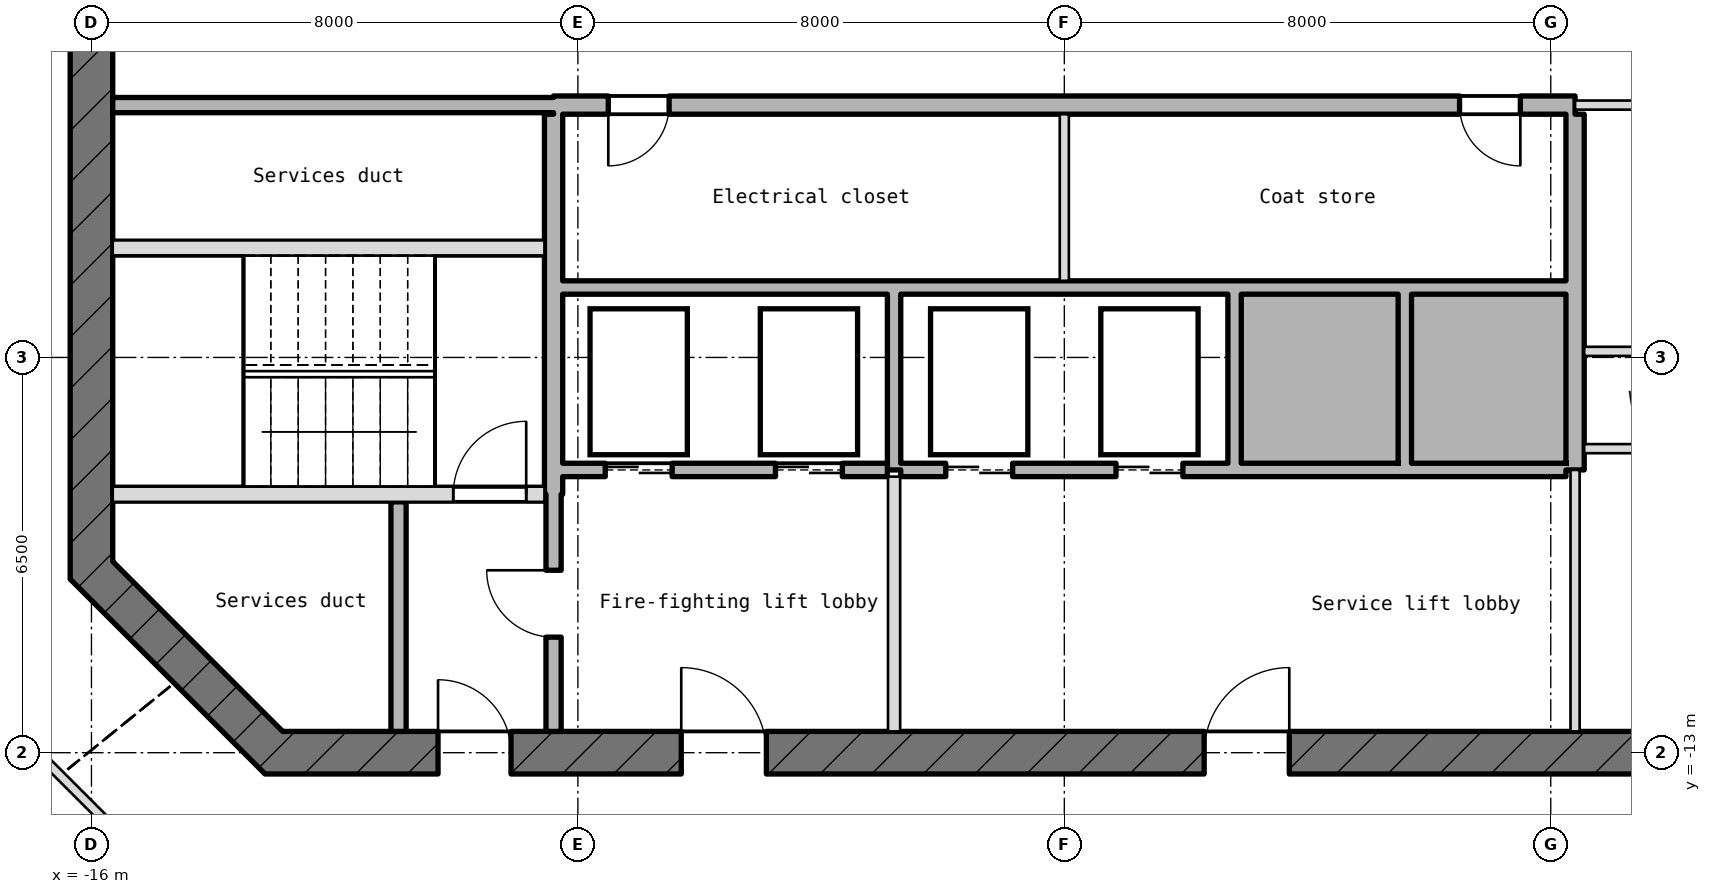
"""IFC4 building model, lengths in metres.
Left out: names, types, materials, properties, quantities, classifications, styles, units other than length and angle.
Written with IfcOpenShell. Run it as: python <this file> out.ifc"""

import sys

from ifc_helpers import new_model, si_unit, direction, frame, frame_2d, origin, place, context, subcontext, project, spatial, rectangle, extrude, element, fill, save


model = new_model("IFC4")
c1 = context("Model", 3, precision=1e-05, world=origin(), true_north=direction((0.0, 1.0)))
c2 = subcontext(c1, "Body", "Model", "MODEL_VIEW")
j1 = project(units=[si_unit("LENGTHUNIT", "METRE"), si_unit("PLANEANGLEUNIT", "RADIAN")], contexts=[c1])
p1 = place(None, origin())
s1 = spatial("IfcSite", under=j1, at=p1, CompositionType="ELEMENT")
p2 = place(p1, origin())
s2 = spatial("IfcBuilding", under=s1, at=p2, CompositionType="ELEMENT")
p3 = place(p2, frame((0.0, 0.0, 401.95)))
s3 = spatial("IfcBuildingStorey", under=s2, at=p3, CompositionType="ELEMENT", Elevation=401.95)
p4 = place(p3, frame((-16.0, 10.145, -0.25), z_axis=(0.0, 0.0, 1.0), x_axis=(0.0, -1.0, 0.0)))
e1 = element("IfcWall", 1, at=p4, inside=s3, PredefinedType="SHEAR", context=c2, shape_type="SweptSolid", body=[
    extrude(rectangle(XDim=20.29, YDim=0.7, at=frame_2d((10.145, 0.0))), origin(), (0.0, 0.0, 1.0), 5.55),
])
p5 = place(p4, frame((8.945, 0.0, 0.25)))
e2 = element("IfcOpeningElement", 2, at=p5, cuts=e1, PredefinedType="OPENING", context=c2, shape_type="SweptSolid", body=[
    extrude(rectangle(XDim=2.4, YDim=2.1, at=frame_2d((1.2, 1.05))), frame((0.0, 0.36, 0.0), z_axis=(0.0, -1.0, 0.0), x_axis=(1.0, 0.0, 0.0)), (0.0, 0.0, 1.0), 0.72),
])
p6 = place(p4, frame((5.545, 0.0, 0.25)))
e3 = element("IfcOpeningElement", 3, at=p6, cuts=e1, PredefinedType="OPENING", context=c2, shape_type="SweptSolid", body=[
    extrude(rectangle(XDim=1.2, YDim=2.1, at=frame_2d((0.6, 1.05))), frame((0.0, 0.36, 0.0), z_axis=(0.0, -1.0, 0.0), x_axis=(1.0, 0.0, 0.0)), (0.0, 0.0, 1.0), 0.72),
])
p7 = place(p3, frame((-16.103, -9.897, -0.25), z_axis=(0.0, 0.0, 1.0), x_axis=(0.707106781187, -0.707106781187, 0.0)))
e4 = element("IfcWall", 4, at=p7, inside=s3, PredefinedType="SHEAR", context=c2, shape_type="SweptSolid", body=[
    extrude(rectangle(XDim=4.533, YDim=0.7, at=frame_2d((2.266, 0.0))), origin(), (0.0, 0.0, 1.0), 5.55),
])
p8 = place(p3, frame((-13.145, -13.0, -0.25), z_axis=(0.0, 0.0, 1.0), x_axis=(1.0, 0.0, 0.0)))
e5 = element("IfcWall", 5, at=p8, inside=s3, PredefinedType="SHEAR", context=c2, shape_type="SweptSolid", body=[
    extrude(rectangle(XDim=26.29, YDim=0.7, at=frame_2d((13.145, 0.0))), origin(), (0.0, 0.0, 1.0), 5.55),
])
p9 = place(p8, frame((2.845, 0.0, 0.25)))
e6 = element("IfcOpeningElement", 6, at=p9, cuts=e5, PredefinedType="OPENING", context=c2, shape_type="SweptSolid", body=[
    extrude(rectangle(XDim=1.2, YDim=2.1, at=frame_2d((0.6, 1.05))), frame((0.0, 0.36, 0.0), z_axis=(0.0, -1.0, 0.0), x_axis=(1.0, 0.0, 0.0)), (0.0, 0.0, 1.0), 0.72),
])
p10 = place(p8, frame((6.845, 0.0, 0.25)))
e7 = element("IfcOpeningElement", 7, at=p10, cuts=e5, PredefinedType="OPENING", context=c2, shape_type="SweptSolid", body=[
    extrude(rectangle(XDim=1.4, YDim=2.1, at=frame_2d((0.7, 1.05))), frame((0.0, 0.36, 0.0), z_axis=(0.0, -1.0, 0.0), x_axis=(1.0, 0.0, 0.0)), (0.0, 0.0, 1.0), 0.72),
])
p11 = place(p8, frame((15.445, 0.0, 0.25)))
e8 = element("IfcOpeningElement", 8, at=p11, cuts=e5, PredefinedType="OPENING", context=c2, shape_type="SweptSolid", body=[
    extrude(rectangle(XDim=1.4, YDim=2.1, at=frame_2d((0.7, 1.05))), frame((0.0, 0.36, 0.0), z_axis=(0.0, -1.0, 0.0), x_axis=(1.0, 0.0, 0.0)), (0.0, 0.0, 1.0), 0.72),
])
p12 = place(p3, frame((-15.65, -8.75, -0.25), z_axis=(0.0, 0.0, 1.0), x_axis=(1.0, 0.0, 0.0)))
e9 = element("IfcWall", 9, at=p12, inside=s3, PredefinedType="SHEAR", context=c2, shape_type="SweptSolid", body=[
    extrude(rectangle(XDim=7.1, YDim=0.25, at=frame_2d((3.55, 0.0))), origin(), (0.0, 0.0, 1.0), 5.55),
])
p13 = place(p12, frame((5.6, 0.0, 0.25)))
e10 = element("IfcOpeningElement", 10, at=p13, cuts=e9, PredefinedType="OPENING", context=c2, shape_type="SweptSolid", body=[
    extrude(rectangle(XDim=1.2, YDim=2.1, at=frame_2d((0.6, 1.05))), frame((0.0, 0.135, 0.0), z_axis=(0.0, -1.0, 0.0), x_axis=(1.0, 0.0, 0.0)), (0.0, 0.0, 1.0), 0.27),
])
p14 = place(p3, frame((-8.25, -8.35, 0.0), z_axis=(0.0, 0.0, 1.0), x_axis=(1.0, 0.0, 0.0)))
e11 = element("IfcWall", 11, at=p14, inside=s3, PredefinedType="STANDARD", context=c2, shape_type="SweptSolid", body=[
    extrude(rectangle(XDim=5.34, YDim=0.22, at=frame_2d((2.67, 0.0))), origin(), (0.0, 0.0, 1.0), 5.3),
])
p15 = place(p14, frame((0.7, 0.0, 0.0)))
e12 = element("IfcOpeningElement", 12, at=p15, cuts=e11, PredefinedType="OPENING", context=c2, shape_type="SweptSolid", body=[
    extrude(rectangle(XDim=1.1, YDim=2.1, at=frame_2d((0.55, 1.05))), frame((0.0, 0.12, 0.0), z_axis=(0.0, -1.0, 0.0), x_axis=(1.0, 0.0, 0.0)), (0.0, 0.0, 1.0), 0.24),
])
p16 = place(p14, frame((3.5, 0.0, 0.0)))
e13 = element("IfcOpeningElement", 13, at=p16, cuts=e11, PredefinedType="OPENING", context=c2, shape_type="SweptSolid", body=[
    extrude(rectangle(XDim=1.1, YDim=2.1, at=frame_2d((0.55, 1.05))), frame((0.0, 0.12, 0.0), z_axis=(0.0, -1.0, 0.0), x_axis=(1.0, 0.0, 0.0)), (0.0, 0.0, 1.0), 0.24),
])
p17 = place(p3, frame((-2.69, -8.35, 0.0), z_axis=(0.0, 0.0, 1.0), x_axis=(1.0, 0.0, 0.0)))
e14 = element("IfcWall", 14, at=p17, inside=s3, PredefinedType="STANDARD", context=c2, shape_type="SweptSolid", body=[
    extrude(rectangle(XDim=10.94, YDim=0.22, at=frame_2d((5.47, 0.0))), origin(), (0.0, 0.0, 1.0), 5.3),
])
p18 = place(p17, frame((0.74, 0.0, 0.0)))
e15 = element("IfcOpeningElement", 15, at=p18, cuts=e14, PredefinedType="OPENING", context=c2, shape_type="SweptSolid", body=[
    extrude(rectangle(XDim=1.1, YDim=2.1, at=frame_2d((0.55, 1.05))), frame((0.0, 0.12, 0.0), z_axis=(0.0, -1.0, 0.0), x_axis=(1.0, 0.0, 0.0)), (0.0, 0.0, 1.0), 0.24),
])
p19 = place(p17, frame((3.54, 0.0, 0.0)))
e16 = element("IfcOpeningElement", 16, at=p19, cuts=e14, PredefinedType="OPENING", context=c2, shape_type="SweptSolid", body=[
    extrude(rectangle(XDim=1.1, YDim=2.1, at=frame_2d((0.55, 1.05))), frame((0.0, 0.12, 0.0), z_axis=(0.0, -1.0, 0.0), x_axis=(1.0, 0.0, 0.0)), (0.0, 0.0, 1.0), 0.24),
])
p20 = place(p3, frame((8.55, -8.0, 0.0), z_axis=(0.0, 0.0, 1.0), x_axis=(1.0, 0.0, 0.0)))
e17 = element("IfcWall", 17, at=p20, inside=s3, PredefinedType="PARTITIONING", context=c2, shape_type="SweptSolid", body=[
    extrude(rectangle(XDim=7.1, YDim=0.15, at=frame_2d((3.55, 0.0))), origin(), (0.0, 0.0, 1.0), 5.3),
])
p21 = place(p20, frame((2.975, 0.0, 0.0)))
e18 = element("IfcOpeningElement", 18, at=p21, cuts=e17, PredefinedType="OPENING", context=c2, shape_type="SweptSolid", body=[
    extrude(rectangle(XDim=1.0, YDim=2.1, at=frame_2d((0.5, 1.05))), frame((0.0, 0.085, 0.0), z_axis=(0.0, -1.0, 0.0), x_axis=(1.0, 0.0, 0.0)), (0.0, 0.0, 1.0), 0.17),
])
p22 = place(p3, frame((8.55, -6.4, 0.0), z_axis=(0.0, 0.0, 1.0), x_axis=(1.0, 0.0, 0.0)))
e19 = element("IfcWall", 19, at=p22, inside=s3, PredefinedType="PARTITIONING", context=c2, shape_type="SweptSolid", body=[
    extrude(rectangle(XDim=7.1, YDim=0.15, at=frame_2d((3.55, 0.0))), origin(), (0.0, 0.0, 1.0), 5.3),
])
p23 = place(p22, frame((2.975, 0.0, 0.0)))
e20 = element("IfcOpeningElement", 20, at=p23, cuts=e19, PredefinedType="OPENING", context=c2, shape_type="SweptSolid", body=[
    extrude(rectangle(XDim=1.0, YDim=2.1, at=frame_2d((0.5, 1.05))), frame((0.0, 0.085, 0.0), z_axis=(0.0, -1.0, 0.0), x_axis=(1.0, 0.0, 0.0)), (0.0, 0.0, 1.0), 0.17),
])
p24 = place(p3, frame((-8.25, -5.35, 0.0), z_axis=(0.0, 0.0, 1.0), x_axis=(1.0, 0.0, 0.0)))
e21 = element("IfcWall", 21, at=p24, inside=s3, PredefinedType="STANDARD", context=c2, shape_type="SweptSolid", body=[
    extrude(rectangle(XDim=16.5, YDim=0.22, at=frame_2d((8.25, 0.0))), origin(), (0.0, 0.0, 1.0), 5.3),
])
p25 = place(p3, frame((-15.65, -4.7, -0.25), z_axis=(0.0, 0.0, 1.0), x_axis=(1.0, 0.0, 0.0)))
e22 = element("IfcWall", 22, at=p25, inside=s3, PredefinedType="SHEAR", context=c2, shape_type="SweptSolid", body=[
    extrude(rectangle(XDim=7.1, YDim=0.25, at=frame_2d((3.55, 0.0))), origin(), (0.0, 0.0, 1.0), 5.55),
])
p26 = place(p3, frame((-15.65, -2.35, 0.0), z_axis=(0.0, 0.0, 1.0), x_axis=(1.0, 0.0, 0.0)))
e23 = element("IfcWall", 23, at=p26, inside=s3, PredefinedType="STANDARD", context=c2, shape_type="SweptSolid", body=[
    extrude(rectangle(XDim=7.25, YDim=0.25, at=frame_2d((3.625, 0.0))), origin(), (0.0, 0.0, 1.0), 5.3),
])
p27 = place(p3, frame((-8.4, -2.35, -0.25), z_axis=(0.0, 0.0, 1.0), x_axis=(1.0, 0.0, 0.0)))
e24 = element("IfcWall", 24, at=p27, inside=s3, PredefinedType="SHEAR", context=c2, shape_type="SweptSolid", body=[
    extrude(rectangle(XDim=16.8, YDim=0.3, at=frame_2d((8.4, 0.0))), origin(), (0.0, 0.0, 1.0), 5.55),
])
p28 = place(p27, frame((0.9, 0.0, 0.25)))
e25 = element("IfcOpeningElement", 25, at=p28, cuts=e24, PredefinedType="OPENING", context=c2, shape_type="SweptSolid", body=[
    extrude(rectangle(XDim=1.0, YDim=2.1, at=frame_2d((0.5, 1.05))), frame((0.0, 0.16, 0.0), z_axis=(0.0, -1.0, 0.0), x_axis=(1.0, 0.0, 0.0)), (0.0, 0.0, 1.0), 0.32),
])
p29 = place(p27, frame((14.9, 0.0, 0.25)))
e26 = element("IfcOpeningElement", 26, at=p29, cuts=e24, PredefinedType="OPENING", context=c2, shape_type="SweptSolid", body=[
    extrude(rectangle(XDim=1.0, YDim=2.1, at=frame_2d((0.5, 1.05))), frame((0.0, 0.16, 0.0), z_axis=(0.0, -1.0, 0.0), x_axis=(1.0, 0.0, 0.0)), (0.0, 0.0, 1.0), 0.32),
])
p30 = place(p3, frame((8.4, -2.35, 0.0), z_axis=(0.0, 0.0, 1.0), x_axis=(1.0, 0.0, 0.0)))
e27 = element("IfcWall", 27, at=p30, inside=s3, PredefinedType="PARTITIONING", context=c2, shape_type="SweptSolid", body=[
    extrude(rectangle(XDim=7.25, YDim=0.15, at=frame_2d((3.625, 0.0))), origin(), (0.0, 0.0, 1.0), 5.3),
])
p31 = place(p3, frame((-10.95, -12.65, 0.0), z_axis=(0.0, 0.0, 1.0), x_axis=(0.0, 1.0, 0.0)))
e28 = element("IfcWall", 28, at=p31, inside=s3, PredefinedType="STANDARD", context=c2, shape_type="SweptSolid", body=[
    extrude(rectangle(XDim=3.775, YDim=0.25, at=frame_2d((1.887, 0.0))), origin(), (0.0, 0.0, 1.0), 5.3),
])
p32 = place(p3, frame((-8.4, -12.65, 0.0), z_axis=(0.0, 0.0, 1.0), x_axis=(0.0, 1.0, 0.0)))
e29 = element("IfcWall", 29, at=p32, inside=s3, PredefinedType="STANDARD", context=c2, shape_type="SweptSolid", body=[
    extrude(rectangle(XDim=3.9, YDim=0.25, at=frame_2d((1.95, 0.0))), origin(), (0.0, 0.0, 1.0), 5.3),
])
p33 = place(p32, frame((1.55, 0.0, 0.0)))
e30 = element("IfcOpeningElement", 30, at=p33, cuts=e29, PredefinedType="OPENING", context=c2, shape_type="SweptSolid", body=[
    extrude(rectangle(XDim=1.1, YDim=2.1, at=frame_2d((0.55, 1.05))), frame((0.0, 0.135, 0.0), z_axis=(0.0, -1.0, 0.0), x_axis=(1.0, 0.0, 0.0)), (0.0, 0.0, 1.0), 0.27),
])
p34 = place(p3, frame((-8.4, -8.75, -0.25), z_axis=(0.0, 0.0, 1.0), x_axis=(0.0, 1.0, 0.0)))
e31 = element("IfcWall", 31, at=p34, inside=s3, PredefinedType="SHEAR", context=c2, shape_type="SweptSolid", body=[
    extrude(rectangle(XDim=6.25, YDim=0.3, at=frame_2d((3.125, 0.0))), origin(), (0.0, 0.0, 1.0), 5.55),
])
p35 = place(p3, frame((-2.8, -12.65, 0.0), z_axis=(0.0, 0.0, 1.0), x_axis=(0.0, 1.0, 0.0)))
e32 = element("IfcWall", 32, at=p35, inside=s3, PredefinedType="PARTITIONING", context=c2, shape_type="SweptSolid", body=[
    extrude(rectangle(XDim=4.19, YDim=0.2, at=frame_2d((2.095, 0.0))), origin(), (0.0, 0.0, 1.0), 5.3),
])
p36 = place(p3, frame((-2.8, -8.35, 0.0), z_axis=(0.0, 0.0, 1.0), x_axis=(0.0, 1.0, 0.0)))
e33 = element("IfcWall", 33, at=p36, inside=s3, PredefinedType="STANDARD", context=c2, shape_type="SweptSolid", body=[
    extrude(rectangle(XDim=2.89, YDim=0.22, at=frame_2d((1.445, 0.0))), origin(), (0.0, 0.0, 1.0), 5.3),
])
p37 = place(p3, frame((0.0, -5.24, 0.0), z_axis=(0.0, 0.0, 1.0), x_axis=(0.0, 1.0, 0.0)))
e34 = element("IfcWall", 34, at=p37, inside=s3, PredefinedType="PARTITIONING", context=c2, shape_type="SweptSolid", body=[
    extrude(rectangle(XDim=2.74, YDim=0.15, at=frame_2d((1.37, 0.0))), origin(), (0.0, 0.0, 1.0), 5.3),
])
for number, where, z_axis, x_axis in (
    (35, (2.8, -8.24, 0.0), (0.0, 0.0, 1.0), (0.0, 1.0, 0.0)),
    (36, (5.6, -8.24, 0.0), (0.0, 0.0, 1.0), (0.0, 1.0, 0.0)),
):
    element("IfcWall", number, at=place(p3, frame(where, z_axis=z_axis, x_axis=x_axis)), inside=s3, PredefinedType="STANDARD", context=c2, shape_type="SweptSolid", body=[
        extrude(rectangle(XDim=2.78, YDim=0.22, at=frame_2d((1.39, 0.0))), origin(), (0.0, 0.0, 1.0), 5.3),
    ])
p38 = place(p3, frame((8.4, -12.65, 0.0), z_axis=(0.0, 0.0, 1.0), x_axis=(0.0, 1.0, 0.0)))
e37 = element("IfcWall", 37, at=p38, inside=s3, PredefinedType="PARTITIONING", context=c2, shape_type="SweptSolid", body=[
    extrude(rectangle(XDim=4.3, YDim=0.15, at=frame_2d((2.15, 0.0))), origin(), (0.0, 0.0, 1.0), 5.3),
])
p39 = place(p3, frame((8.4, -8.35, -0.25), z_axis=(0.0, 0.0, 1.0), x_axis=(0.0, 1.0, 0.0)))
e38 = element("IfcWall", 38, at=p39, inside=s3, PredefinedType="SHEAR", context=c2, shape_type="SweptSolid", body=[
    extrude(rectangle(XDim=5.85, YDim=0.3, at=frame_2d((2.925, 0.0))), origin(), (0.0, 0.0, 1.0), 5.55),
])
p40 = place(p3, frame((-14.139, -15.75, 0.0), z_axis=(0.0, 0.0, 1.0), x_axis=(-0.707106781187, 0.707106781187, 0.0)))
e39 = element("IfcWall", 39, at=p40, inside=s3, PredefinedType="PARTITIONING", context=c2, shape_type="SweptSolid", body=[
    extrude(rectangle(XDim=6.521, YDim=0.15, at=frame_2d((3.26, 0.0))), origin(), (0.0, 0.0, 1.0), 5.3),
])
p41 = place(p15, origin())
e40 = element("IfcDoor", 40, at=p41, inside=s3, OperationType="DOUBLE_DOOR_SLIDING", PredefinedType="DOOR", context=c2, shape_type="SweptSolid", body=[
    extrude(rectangle(XDim=1.1, YDim=2.1, at=frame_2d((0.55, 1.05))), frame((0.0, 0.025, 0.0), z_axis=(0.0, -1.0, 0.0), x_axis=(1.0, 0.0, 0.0)), (0.0, 0.0, 1.0), 0.05),
])
fill(e12, e40)
p42 = place(p16, origin())
e41 = element("IfcDoor", 41, at=p42, inside=s3, OperationType="DOUBLE_DOOR_SLIDING", PredefinedType="DOOR", context=c2, shape_type="SweptSolid", body=[
    extrude(rectangle(XDim=1.1, YDim=2.1, at=frame_2d((0.55, 1.05))), frame((0.0, 0.025, 0.0), z_axis=(0.0, -1.0, 0.0), x_axis=(1.0, 0.0, 0.0)), (0.0, 0.0, 1.0), 0.05),
])
fill(e13, e41)
p43 = place(p18, origin())
e42 = element("IfcDoor", 42, at=p43, inside=s3, OperationType="DOUBLE_DOOR_SLIDING", PredefinedType="DOOR", context=c2, shape_type="SweptSolid", body=[
    extrude(rectangle(XDim=1.1, YDim=2.1, at=frame_2d((0.55, 1.05))), frame((0.0, 0.025, 0.0), z_axis=(0.0, -1.0, 0.0), x_axis=(1.0, 0.0, 0.0)), (0.0, 0.0, 1.0), 0.05),
])
fill(e15, e42)
p44 = place(p19, origin())
e43 = element("IfcDoor", 43, at=p44, inside=s3, OperationType="DOUBLE_DOOR_SLIDING", PredefinedType="DOOR", context=c2, shape_type="SweptSolid", body=[
    extrude(rectangle(XDim=1.1, YDim=2.1, at=frame_2d((0.55, 1.05))), frame((0.0, 0.025, 0.0), z_axis=(0.0, -1.0, 0.0), x_axis=(1.0, 0.0, 0.0)), (0.0, 0.0, 1.0), 0.05),
])
fill(e16, e43)
p45 = place(p13, origin())
e44 = element("IfcDoor", 44, at=p45, inside=s3, OperationType="SINGLE_SWING_RIGHT", PredefinedType="DOOR", context=c2, shape_type="SweptSolid", body=[
    extrude(rectangle(XDim=1.2, YDim=2.1, at=frame_2d((0.6, 1.05))), frame((0.0, 0.025, 0.0), z_axis=(0.0, -1.0, 0.0), x_axis=(1.0, 0.0, 0.0)), (0.0, 0.0, 1.0), 0.05),
])
fill(e10, e44)
p46 = place(p33, origin())
e45 = element("IfcDoor", 45, at=p46, inside=s3, OperationType="SINGLE_SWING_RIGHT", PredefinedType="DOOR", context=c2, shape_type="SweptSolid", body=[
    extrude(rectangle(XDim=1.1, YDim=2.1, at=frame_2d((0.55, 1.05))), frame((0.0, 0.025, 0.0), z_axis=(0.0, -1.0, 0.0), x_axis=(1.0, 0.0, 0.0)), (0.0, 0.0, 1.0), 0.05),
])
fill(e30, e45)
p47 = place(p9, origin())
e46 = element("IfcDoor", 46, at=p47, inside=s3, OperationType="SINGLE_SWING_RIGHT", PredefinedType="DOOR", context=c2, shape_type="SweptSolid", body=[
    extrude(rectangle(XDim=1.2, YDim=2.1, at=frame_2d((0.6, 1.05))), frame((0.0, 0.025, 0.0), z_axis=(0.0, -1.0, 0.0), x_axis=(1.0, 0.0, 0.0)), (0.0, 0.0, 1.0), 0.05),
])
fill(e6, e46)
p48 = place(p10, origin())
e47 = element("IfcDoor", 47, at=p48, inside=s3, OperationType="SINGLE_SWING_RIGHT", PredefinedType="DOOR", context=c2, shape_type="SweptSolid", body=[
    extrude(rectangle(XDim=1.4, YDim=2.1, at=frame_2d((0.7, 1.05))), frame((0.0, 0.025, 0.0), z_axis=(0.0, -1.0, 0.0), x_axis=(1.0, 0.0, 0.0)), (0.0, 0.0, 1.0), 0.05),
])
fill(e7, e47)
p49 = place(p11, origin())
e48 = element("IfcDoor", 48, at=p49, inside=s3, OperationType="SINGLE_SWING_RIGHT", PredefinedType="DOOR", context=c2, shape_type="SweptSolid", body=[
    extrude(rectangle(XDim=1.4, YDim=2.1, at=frame_2d((0.7, 1.05))), frame((0.0, 0.025, 0.0), z_axis=(0.0, -1.0, 0.0), x_axis=(1.0, 0.0, 0.0)), (0.0, 0.0, 1.0), 0.05),
])
fill(e8, e48)
p50 = place(p28, frame((1.0, 0.0, 0.0), z_axis=(0.0, 0.0, 1.0), x_axis=(-1.0, 0.0, 0.0)))
e49 = element("IfcDoor", 49, at=p50, inside=s3, OperationType="SINGLE_SWING_LEFT", PredefinedType="DOOR", context=c2, shape_type="SweptSolid", body=[
    extrude(rectangle(XDim=1.0, YDim=2.1, at=frame_2d((0.5, 1.05))), frame((0.0, 0.025, 0.0), z_axis=(0.0, -1.0, 0.0), x_axis=(1.0, 0.0, 0.0)), (0.0, 0.0, 1.0), 0.05),
])
fill(e25, e49)
p51 = place(p29, frame((1.0, 0.0, 0.0), z_axis=(0.0, 0.0, 1.0), x_axis=(-1.0, 0.0, 0.0)))
e50 = element("IfcDoor", 50, at=p51, inside=s3, OperationType="SINGLE_SWING_LEFT", PredefinedType="DOOR", context=c2, shape_type="SweptSolid", body=[
    extrude(rectangle(XDim=1.0, YDim=2.1, at=frame_2d((0.5, 1.05))), frame((0.0, 0.025, 0.0), z_axis=(0.0, -1.0, 0.0), x_axis=(1.0, 0.0, 0.0)), (0.0, 0.0, 1.0), 0.05),
])
fill(e26, e50)
save(model, sys.argv[1])
